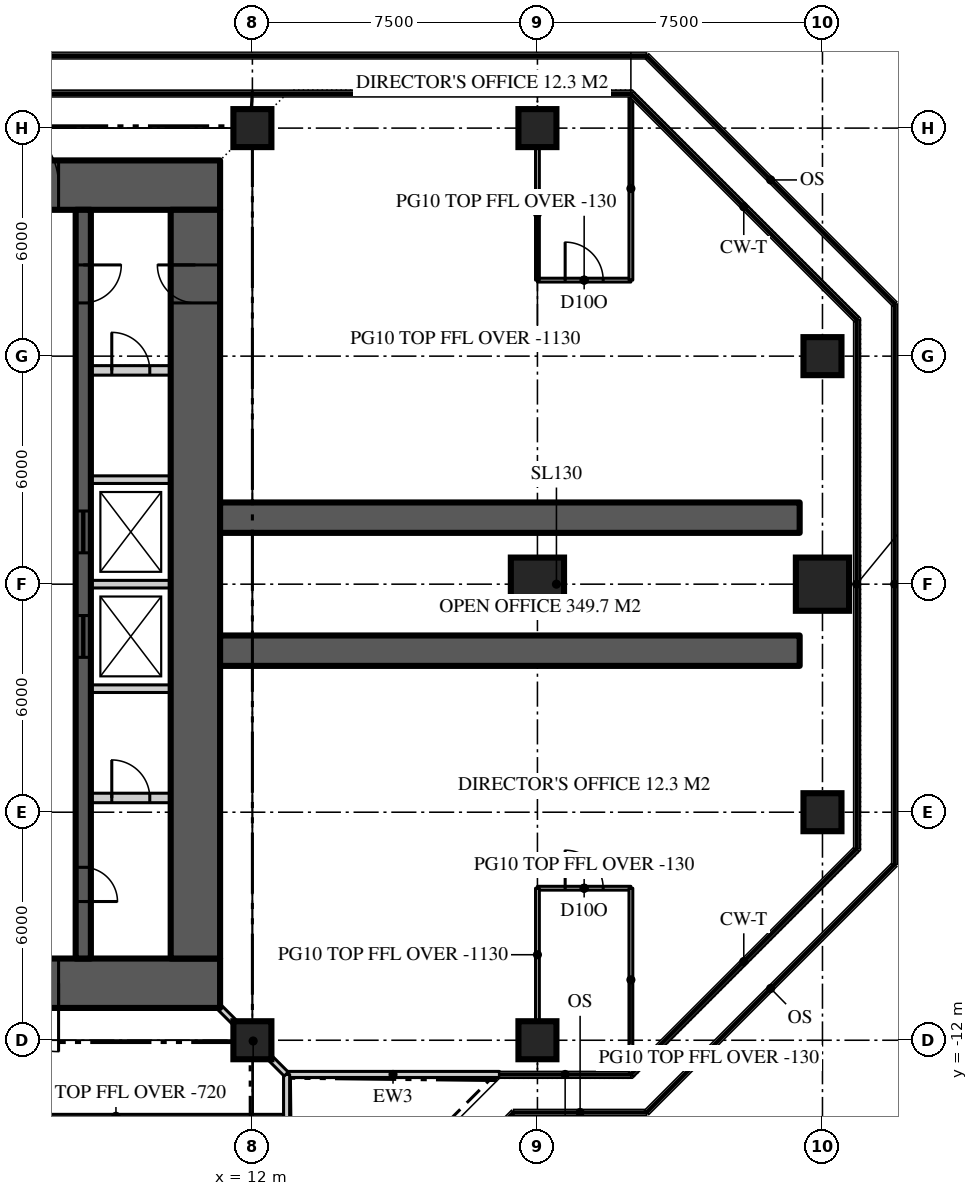
"""IFC4 building model, lengths in metres.
Left out: names, types, materials, properties, quantities, classifications, styles, units other than length and angle.
Written with IfcOpenShell. Run it as: python <this file> out.ifc"""

import sys

from ifc_helpers import new_model, si_unit, direction, frame, frame_2d, origin, origin_2d, place, context, subcontext, project, spatial, rectangle, extrude, element, fill, save


model = new_model("IFC4")
c1 = context("Model", 3, precision=1e-05, world=origin(), true_north=direction((0.0, 1.0)))
c2 = subcontext(c1, "Body", "Model", "MODEL_VIEW")
j1 = project(units=[si_unit("LENGTHUNIT", "METRE"), si_unit("PLANEANGLEUNIT", "RADIAN")], contexts=[c1])
p1 = place(None, origin())
s1 = spatial("IfcSite", under=j1, at=p1, CompositionType="ELEMENT")
p2 = place(p1, origin())
s2 = spatial("IfcBuilding", under=s1, at=p2, CompositionType="ELEMENT")
p3 = place(p2, frame((0.0, 0.0, 279.0)))
s3 = spatial("IfcBuildingStorey", under=s2, at=p3, CompositionType="ELEMENT", Elevation=279.0)
p4 = place(p3, frame((-11.15, 10.5, 0.0), z_axis=(0.0, 0.0, 1.0), x_axis=(1.0, 0.0, 0.0)))
e1 = element("IfcWall", 1, at=p4, inside=s3, PredefinedType="SHEAR", context=c2, shape_type="SweptSolid", body=[
    extrude(rectangle(XDim=22.3, YDim=1.3, at=frame_2d((11.15, 0.0))), origin(), (0.0, 0.0, 1.0), 3.9),
])
p5 = place(p4, frame((4.25, 0.0, 0.0)))
e2 = element("IfcOpeningElement", 2, at=p5, cuts=e1, PredefinedType="OPENING", context=c2, shape_type="SweptSolid", body=[
    extrude(rectangle(XDim=1.8, YDim=2.2, at=frame_2d((0.9, 1.1))), frame((0.0, 0.66, 0.0), z_axis=(0.0, -1.0, 0.0), x_axis=(1.0, 0.0, 0.0)), (0.0, 0.0, 1.0), 1.32),
])
p6 = place(p4, frame((16.25, 0.0, 0.0)))
e3 = element("IfcOpeningElement", 3, at=p6, cuts=e1, PredefinedType="OPENING", context=c2, shape_type="SweptSolid", body=[
    extrude(rectangle(XDim=1.8, YDim=2.2, at=frame_2d((0.9, 1.1))), frame((0.0, 0.66, 0.0), z_axis=(0.0, -1.0, 0.0), x_axis=(1.0, 0.0, 0.0)), (0.0, 0.0, 1.0), 1.32),
])
p7 = place(p3, frame((11.15, -10.5, 0.0), z_axis=(0.0, 0.0, 1.0), x_axis=(-1.0, 0.0, 0.0)))
e4 = element("IfcWall", 4, at=p7, inside=s3, PredefinedType="SHEAR", context=c2, shape_type="SweptSolid", body=[
    extrude(rectangle(XDim=22.3, YDim=1.3, at=frame_2d((11.15, 0.0))), origin(), (0.0, 0.0, 1.0), 3.9),
])
p8 = place(p7, frame((16.25, 0.0, 0.0)))
e5 = element("IfcOpeningElement", 5, at=p8, cuts=e4, PredefinedType="OPENING", context=c2, shape_type="SweptSolid", body=[
    extrude(rectangle(XDim=1.8, YDim=2.2, at=frame_2d((0.9, 1.1))), frame((0.0, 0.66, 0.0), z_axis=(0.0, -1.0, 0.0), x_axis=(1.0, 0.0, 0.0)), (0.0, 0.0, 1.0), 1.32),
])
p9 = place(p7, frame((4.25, 0.0, 0.0)))
e6 = element("IfcOpeningElement", 6, at=p9, cuts=e4, PredefinedType="OPENING", context=c2, shape_type="SweptSolid", body=[
    extrude(rectangle(XDim=1.8, YDim=2.2, at=frame_2d((0.9, 1.1))), frame((0.0, 0.66, 0.0), z_axis=(0.0, -1.0, 0.0), x_axis=(1.0, 0.0, 0.0)), (0.0, 0.0, 1.0), 1.32),
])
p10 = place(p3, frame((10.5, -9.85, 0.0), z_axis=(0.0, 0.0, 1.0), x_axis=(0.0, 1.0, 0.0)))
e7 = element("IfcWall", 7, at=p10, inside=s3, PredefinedType="SHEAR", context=c2, shape_type="SweptSolid", body=[
    extrude(rectangle(XDim=19.7, YDim=1.3, at=frame_2d((9.85, 0.0))), origin(), (0.0, 0.0, 1.0), 3.9),
])
p11 = place(p10, frame((17.25, 0.0, 0.0)))
e8 = element("IfcOpeningElement", 8, at=p11, cuts=e7, PredefinedType="OPENING", context=c2, shape_type="SweptSolid", body=[
    extrude(rectangle(XDim=1.0, YDim=2.2, at=frame_2d((0.5, 1.1))), frame((0.0, 0.66, 0.0), z_axis=(0.0, -1.0, 0.0), x_axis=(1.0, 0.0, 0.0)), (0.0, 0.0, 1.0), 1.32),
])
for number, where, z_axis, x_axis in (
    (9, (11.15, -1.75, 0.0), (0.0, 0.0, 1.0), (1.0, 0.0, 0.0)),
    (10, (11.15, 1.75, 0.0), (0.0, 0.0, 1.0), (1.0, 0.0, 0.0)),
):
    element("IfcWall", number, at=place(p3, frame(where, z_axis=z_axis, x_axis=x_axis)), inside=s3, PredefinedType="SHEAR", context=c2, shape_type="SweptSolid", body=[
        extrude(rectangle(XDim=15.25, YDim=0.8, at=frame_2d((7.625, 0.0))), origin(), (0.0, 0.0, 1.0), 3.9),
    ])
for number, where, z_axis, x_axis in (
    (11, (12.0, -12.0, 0.0), (0.0, 0.0, 1.0), (1.0, 0.0, 0.0)),
    (12, (19.5, -12.0, 0.0), (0.0, 0.0, 1.0), (1.0, 0.0, 0.0)),
    (13, (27.0, -6.0, 0.0), (0.0, 0.0, 1.0), (1.0, 0.0, 0.0)),
):
    element("IfcColumn", number, at=place(p3, frame(where, z_axis=z_axis, x_axis=x_axis)), inside=s3, PredefinedType="COLUMN", context=c2, shape_type="SweptSolid", body=[
        extrude(rectangle(XDim=1.0, YDim=1.0, at=origin_2d()), origin(), (0.0, 0.0, 1.0), 3.9),
    ])
for number, where, z_axis, x_axis in (
    (14, (19.5, 0.0, 0.0), (0.0, 0.0, 1.0), (1.0, 0.0, 0.0)),
    (15, (27.0, 0.0, 0.0), (0.0, 0.0, 1.0), (1.0, 0.0, 0.0)),
):
    element("IfcColumn", number, at=place(p3, frame(where, z_axis=z_axis, x_axis=x_axis)), inside=s3, PredefinedType="COLUMN", context=c2, shape_type="SweptSolid", body=[
        extrude(rectangle(XDim=1.4, YDim=1.4, at=origin_2d()), origin(), (0.0, 0.0, 1.0), 3.9),
    ])
for number, where, z_axis, x_axis in (
    (16, (27.0, 6.0, 0.0), (0.0, 0.0, 1.0), (1.0, 0.0, 0.0)),
    (17, (12.0, 12.0, 0.0), (0.0, 0.0, 1.0), (1.0, 0.0, 0.0)),
    (18, (19.5, 12.0, 0.0), (0.0, 0.0, 1.0), (1.0, 0.0, 0.0)),
):
    element("IfcColumn", number, at=place(p3, frame(where, z_axis=z_axis, x_axis=x_axis)), inside=s3, PredefinedType="COLUMN", context=c2, shape_type="SweptSolid", body=[
        extrude(rectangle(XDim=1.0, YDim=1.0, at=origin_2d()), origin(), (0.0, 0.0, 1.0), 3.9),
    ])
p12 = place(p3, frame((12.9, -12.9, 0.0), z_axis=(0.0, 0.0, 1.0), x_axis=(1.0, 0.0, 0.0)))
e19 = element("IfcWall", 19, at=p12, inside=s3, PredefinedType="SOLIDWALL", context=c2, shape_type="SweptSolid", body=[
    extrude(rectangle(XDim=5.6, YDim=0.16, at=frame_2d((2.8, 0.0))), origin(), (0.0, 0.0, 1.0), 3.77),
])
p13 = place(p3, frame((12.9, -18.5, 0.0), z_axis=(0.0, 0.0, 1.0), x_axis=(0.0, 1.0, 0.0)))
e20 = element("IfcWall", 20, at=p13, inside=s3, PredefinedType="SOLIDWALL", context=c2, shape_type="SweptSolid", body=[
    extrude(rectangle(XDim=5.6, YDim=0.16, at=frame_2d((2.8, 0.0))), origin(), (0.0, 0.0, 1.0), 3.77),
])
p14 = place(p13, frame((2.3, 0.0, 0.0)))
e21 = element("IfcOpeningElement", 21, at=p14, cuts=e20, PredefinedType="OPENING", context=c2, shape_type="SweptSolid", body=[
    extrude(rectangle(XDim=1.0, YDim=2.2, at=frame_2d((0.5, 1.1))), frame((0.0, 0.09, 0.0), z_axis=(0.0, -1.0, 0.0), x_axis=(1.0, 0.0, 0.0)), (0.0, 0.0, 1.0), 0.18),
])
p15 = place(p3, frame((7.55, 9.85, 0.0), z_axis=(0.0, 0.0, 1.0), x_axis=(0.0, -1.0, 0.0)))
e22 = element("IfcWall", 22, at=p15, inside=s3, PredefinedType="SHEAR", context=c2, shape_type="SweptSolid", body=[
    extrude(rectangle(XDim=19.7, YDim=0.4, at=frame_2d((9.85, 0.0))), origin(), (0.0, 0.0, 1.0), 3.9),
])
p16 = place(p15, frame((1.45, 0.0, 0.0)))
e23 = element("IfcOpeningElement", 23, at=p16, cuts=e22, PredefinedType="OPENING", context=c2, shape_type="SweptSolid", body=[
    extrude(rectangle(XDim=1.0, YDim=2.2, at=frame_2d((0.5, 1.1))), frame((0.0, 0.21, 0.0), z_axis=(0.0, -1.0, 0.0), x_axis=(1.0, 0.0, 0.0)), (0.0, 0.0, 1.0), 0.42),
])
p17 = place(p15, frame((17.3, 0.0, 0.0)))
e24 = element("IfcOpeningElement", 24, at=p17, cuts=e22, PredefinedType="OPENING", context=c2, shape_type="SweptSolid", body=[
    extrude(rectangle(XDim=0.9, YDim=2.1, at=frame_2d((0.45, 1.05))), frame((0.0, 0.21, 0.0), z_axis=(0.0, -1.0, 0.0), x_axis=(1.0, 0.0, 0.0)), (0.0, 0.0, 1.0), 0.42),
])
p18 = place(p15, frame((7.925, 0.0, 0.0)))
e25 = element("IfcOpeningElement", 25, at=p18, cuts=e22, PredefinedType="OPENING", context=c2, shape_type="SweptSolid", body=[
    extrude(rectangle(XDim=1.1, YDim=2.2, at=frame_2d((0.55, 1.1))), frame((0.0, 0.21, 0.0), z_axis=(0.0, -1.0, 0.0), x_axis=(1.0, 0.0, 0.0)), (0.0, 0.0, 1.0), 0.42),
])
p19 = place(p15, frame((10.675, 0.0, 0.0)))
e26 = element("IfcOpeningElement", 26, at=p19, cuts=e22, PredefinedType="OPENING", context=c2, shape_type="SweptSolid", body=[
    extrude(rectangle(XDim=1.1, YDim=2.2, at=frame_2d((0.55, 1.1))), frame((0.0, 0.21, 0.0), z_axis=(0.0, -1.0, 0.0), x_axis=(1.0, 0.0, 0.0)), (0.0, 0.0, 1.0), 0.42),
])
p20 = place(p3, frame((7.75, 5.625, 0.0), z_axis=(0.0, 0.0, 1.0), x_axis=(1.0, 0.0, 0.0)))
e27 = element("IfcWall", 27, at=p20, inside=s3, PredefinedType="SOLIDWALL", context=c2, shape_type="SweptSolid", body=[
    extrude(rectangle(XDim=2.1, YDim=0.25, at=frame_2d((1.05, 0.0))), origin(), (0.0, 0.0, 1.0), 3.7),
])
p21 = place(p20, frame((0.55, 0.0, 0.0)))
e28 = element("IfcOpeningElement", 28, at=p21, cuts=e27, PredefinedType="OPENING", context=c2, shape_type="SweptSolid", body=[
    extrude(rectangle(XDim=1.0, YDim=2.2, at=frame_2d((0.5, 1.1))), frame((0.0, 0.135, 0.0), z_axis=(0.0, -1.0, 0.0), x_axis=(1.0, 0.0, 0.0)), (0.0, 0.0, 1.0), 0.27),
])
p22 = place(p3, frame((7.75, -5.625, 0.0), z_axis=(0.0, 0.0, 1.0), x_axis=(1.0, 0.0, 0.0)))
e29 = element("IfcWall", 29, at=p22, inside=s3, PredefinedType="SOLIDWALL", context=c2, shape_type="SweptSolid", body=[
    extrude(rectangle(XDim=2.1, YDim=0.25, at=frame_2d((1.05, 0.0))), origin(), (0.0, 0.0, 1.0), 3.7),
])
p23 = place(p22, frame((0.55, 0.0, 0.0)))
e30 = element("IfcOpeningElement", 30, at=p23, cuts=e29, PredefinedType="OPENING", context=c2, shape_type="SweptSolid", body=[
    extrude(rectangle(XDim=1.0, YDim=2.2, at=frame_2d((0.5, 1.1))), frame((0.0, 0.135, 0.0), z_axis=(0.0, -1.0, 0.0), x_axis=(1.0, 0.0, 0.0)), (0.0, 0.0, 1.0), 0.27),
])
for number, where, z_axis, x_axis in (
    (31, (7.75, -2.75, 0.0), (0.0, 0.0, 1.0), (1.0, 0.0, 0.0)),
    (32, (7.75, 0.0, 0.0), (0.0, 0.0, 1.0), (1.0, 0.0, 0.0)),
    (33, (7.75, 2.75, 0.0), (0.0, 0.0, 1.0), (1.0, 0.0, 0.0)),
):
    element("IfcWall", number, at=place(p3, frame(where, z_axis=z_axis, x_axis=x_axis)), inside=s3, PredefinedType="SOLIDWALL", context=c2, shape_type="SweptSolid", body=[
        extrude(rectangle(XDim=2.1, YDim=0.2, at=frame_2d((1.05, 0.0))), origin(), (0.0, 0.0, 1.0), 3.7),
    ])
p24 = place(p3, frame((19.5, 8.0, 0.0), z_axis=(0.0, 0.0, 1.0), x_axis=(1.0, 0.0, 0.0)))
e34 = element("IfcWall", 34, at=p24, inside=s3, PredefinedType="PARTITIONING", context=c2, shape_type="SweptSolid", body=[
    extrude(rectangle(XDim=2.459, YDim=0.1, at=frame_2d((1.229, 0.0))), origin(), (0.0, 0.0, 1.0), 3.77),
])
p25 = place(p24, frame((0.729, 0.0, 0.0)))
e35 = element("IfcOpeningElement", 35, at=p25, cuts=e34, PredefinedType="OPENING", context=c2, shape_type="SweptSolid", body=[
    extrude(rectangle(XDim=1.0, YDim=2.2, at=frame_2d((0.5, 1.1))), frame((0.0, 0.06, 0.0), z_axis=(0.0, -1.0, 0.0), x_axis=(1.0, 0.0, 0.0)), (0.0, 0.0, 1.0), 0.12),
])
p26 = place(p3, frame((19.5, 8.0, 0.0), z_axis=(0.0, 0.0, 1.0), x_axis=(0.0, 1.0, 0.0)))
e36 = element("IfcWall", 36, at=p26, inside=s3, PredefinedType="PARTITIONING", context=c2, shape_type="SweptSolid", body=[
    extrude(rectangle(XDim=3.5, YDim=0.1, at=frame_2d((1.75, 0.0))), origin(), (0.0, 0.0, 1.0), 2.77),
])
p27 = place(p3, frame((21.959, 8.0, 0.0), z_axis=(0.0, 0.0, 1.0), x_axis=(0.0, 1.0, 0.0)))
e37 = element("IfcWall", 37, at=p27, inside=s3, PredefinedType="PARTITIONING", context=c2, shape_type="SweptSolid", body=[
    extrude(rectangle(XDim=4.82, YDim=0.1, at=frame_2d((2.41, 0.0))), origin(), (0.0, 0.0, 1.0), 3.77),
])
p28 = place(p3, frame((19.5, -8.0, 0.0), z_axis=(0.0, 0.0, 1.0), x_axis=(1.0, 0.0, 0.0)))
e38 = element("IfcWall", 38, at=p28, inside=s3, PredefinedType="PARTITIONING", context=c2, shape_type="SweptSolid", body=[
    extrude(rectangle(XDim=2.459, YDim=0.1, at=frame_2d((1.229, 0.0))), origin(), (0.0, 0.0, 1.0), 3.77),
])
p29 = place(p28, frame((0.729, 0.0, 0.0)))
e39 = element("IfcOpeningElement", 39, at=p29, cuts=e38, PredefinedType="OPENING", context=c2, shape_type="SweptSolid", body=[
    extrude(rectangle(XDim=1.0, YDim=2.2, at=frame_2d((0.5, 1.1))), frame((0.0, 0.06, 0.0), z_axis=(0.0, -1.0, 0.0), x_axis=(1.0, 0.0, 0.0)), (0.0, 0.0, 1.0), 0.12),
])
p30 = place(p3, frame((19.5, -8.0, 0.0), z_axis=(0.0, 0.0, 1.0), x_axis=(0.0, -1.0, 0.0)))
e40 = element("IfcWall", 40, at=p30, inside=s3, PredefinedType="PARTITIONING", context=c2, shape_type="SweptSolid", body=[
    extrude(rectangle(XDim=3.5, YDim=0.1, at=frame_2d((1.75, 0.0))), origin(), (0.0, 0.0, 1.0), 2.77),
])
p31 = place(p3, frame((21.959, -8.0, 0.0), z_axis=(0.0, 0.0, 1.0), x_axis=(0.0, -1.0, 0.0)))
e41 = element("IfcWall", 41, at=p31, inside=s3, PredefinedType="PARTITIONING", context=c2, shape_type="SweptSolid", body=[
    extrude(rectangle(XDim=4.82, YDim=0.1, at=frame_2d((2.41, 0.0))), origin(), (0.0, 0.0, 1.0), 3.77),
])
p32 = place(p3, frame((4.0, -14.0, 0.0), z_axis=(0.0, 0.0, 1.0), x_axis=(1.0, 0.0, 0.0)))
e42 = element("IfcWall", 42, at=p32, inside=s3, PredefinedType="PARTITIONING", context=c2, shape_type="SweptSolid", body=[
    extrude(rectangle(XDim=8.82, YDim=0.1, at=frame_2d((4.41, 0.0))), origin(), (0.0, 0.0, 1.0), 3.18),
])
p33 = place(p3, frame((11.15, -11.15, 0.0), z_axis=(0.0, 0.0, 1.0), x_axis=(0.707106781187, -0.707106781187, 0.0)))
e43 = element("IfcWall", 43, at=p33, inside=s3, PredefinedType="PARTITIONING", context=c2, shape_type="SweptSolid", body=[
    extrude(rectangle(XDim=2.461, YDim=0.15, at=frame_2d((1.23, 0.0))), origin(), (0.0, 0.0, 1.0), 3.22),
])
p34 = place(p6, origin())
e44 = element("IfcDoor", 44, at=p34, inside=s3, OperationType="DOUBLE_DOOR_DOUBLE_SWING", PredefinedType="DOOR", context=c2, shape_type="SweptSolid", body=[
    extrude(rectangle(XDim=1.8, YDim=2.2, at=frame_2d((0.9, 1.1))), frame((0.0, 0.025, 0.0), z_axis=(0.0, -1.0, 0.0), x_axis=(1.0, 0.0, 0.0)), (0.0, 0.0, 1.0), 0.05),
])
fill(e3, e44)
p35 = place(p9, origin())
e45 = element("IfcDoor", 45, at=p35, inside=s3, OperationType="DOUBLE_DOOR_DOUBLE_SWING", PredefinedType="DOOR", context=c2, shape_type="SweptSolid", body=[
    extrude(rectangle(XDim=1.8, YDim=2.2, at=frame_2d((0.9, 1.1))), frame((0.0, 0.025, 0.0), z_axis=(0.0, -1.0, 0.0), x_axis=(1.0, 0.0, 0.0)), (0.0, 0.0, 1.0), 0.05),
])
fill(e6, e45)
p36 = place(p16, origin())
e46 = element("IfcDoor", 46, at=p36, inside=s3, OperationType="SINGLE_SWING_LEFT", PredefinedType="DOOR", context=c2, shape_type="SweptSolid", body=[
    extrude(rectangle(XDim=1.0, YDim=2.2, at=frame_2d((0.5, 1.1))), frame((0.0, 0.025, 0.0), z_axis=(0.0, -1.0, 0.0), x_axis=(1.0, 0.0, 0.0)), (0.0, 0.0, 1.0), 0.05),
])
fill(e23, e46)
p37 = place(p11, origin())
e47 = element("IfcDoor", 47, at=p37, inside=s3, OperationType="SINGLE_SWING_RIGHT", PredefinedType="DOOR", context=c2, shape_type="SweptSolid", body=[
    extrude(rectangle(XDim=1.0, YDim=2.2, at=frame_2d((0.5, 1.1))), frame((0.0, 0.025, 0.0), z_axis=(0.0, -1.0, 0.0), x_axis=(1.0, 0.0, 0.0)), (0.0, 0.0, 1.0), 0.05),
])
fill(e8, e47)
p38 = place(p17, origin())
e48 = element("IfcDoor", 48, at=p38, inside=s3, OperationType="SINGLE_SWING_RIGHT", PredefinedType="DOOR", context=c2, shape_type="SweptSolid", body=[
    extrude(rectangle(XDim=0.9, YDim=2.1, at=frame_2d((0.45, 1.05))), frame((0.0, 0.025, 0.0), z_axis=(0.0, -1.0, 0.0), x_axis=(1.0, 0.0, 0.0)), (0.0, 0.0, 1.0), 0.05),
])
fill(e24, e48)
p39 = place(p18, origin())
e49 = element("IfcDoor", 49, at=p39, inside=s3, OperationType="SLIDING_TO_LEFT", PredefinedType="DOOR", context=c2, shape_type="SweptSolid", body=[
    extrude(rectangle(XDim=1.1, YDim=2.2, at=frame_2d((0.55, 1.1))), frame((0.0, 0.025, 0.0), z_axis=(0.0, -1.0, 0.0), x_axis=(1.0, 0.0, 0.0)), (0.0, 0.0, 1.0), 0.05),
])
fill(e25, e49)
p40 = place(p19, origin())
e50 = element("IfcDoor", 50, at=p40, inside=s3, OperationType="SLIDING_TO_LEFT", PredefinedType="DOOR", context=c2, shape_type="SweptSolid", body=[
    extrude(rectangle(XDim=1.1, YDim=2.2, at=frame_2d((0.55, 1.1))), frame((0.0, 0.025, 0.0), z_axis=(0.0, -1.0, 0.0), x_axis=(1.0, 0.0, 0.0)), (0.0, 0.0, 1.0), 0.05),
])
fill(e26, e50)
p41 = place(p25, origin())
e51 = element("IfcDoor", 51, at=p41, inside=s3, OperationType="SINGLE_SWING_LEFT", PredefinedType="DOOR", context=c2, shape_type="SweptSolid", body=[
    extrude(rectangle(XDim=1.0, YDim=2.2, at=frame_2d((0.5, 1.1))), frame((0.0, 0.025, 0.0), z_axis=(0.0, -1.0, 0.0), x_axis=(1.0, 0.0, 0.0)), (0.0, 0.0, 1.0), 0.05),
])
fill(e35, e51)
p42 = place(p29, origin())
e52 = element("IfcDoor", 52, at=p42, inside=s3, OperationType="SINGLE_SWING_LEFT", PredefinedType="DOOR", context=c2, shape_type="SweptSolid", body=[
    extrude(rectangle(XDim=1.0, YDim=2.2, at=frame_2d((0.5, 1.1))), frame((0.0, 0.025, 0.0), z_axis=(0.0, -1.0, 0.0), x_axis=(1.0, 0.0, 0.0)), (0.0, 0.0, 1.0), 0.05),
])
fill(e39, e52)
p43 = place(p21, origin())
e53 = element("IfcDoor", 53, at=p43, inside=s3, OperationType="SINGLE_SWING_LEFT", PredefinedType="DOOR", context=c2, shape_type="SweptSolid", body=[
    extrude(rectangle(XDim=1.0, YDim=2.2, at=frame_2d((0.5, 1.1))), frame((0.0, 0.025, 0.0), z_axis=(0.0, -1.0, 0.0), x_axis=(1.0, 0.0, 0.0)), (0.0, 0.0, 1.0), 0.05),
])
fill(e28, e53)
p44 = place(p23, origin())
e54 = element("IfcDoor", 54, at=p44, inside=s3, OperationType="SINGLE_SWING_LEFT", PredefinedType="DOOR", context=c2, shape_type="SweptSolid", body=[
    extrude(rectangle(XDim=1.0, YDim=2.2, at=frame_2d((0.5, 1.1))), frame((0.0, 0.025, 0.0), z_axis=(0.0, -1.0, 0.0), x_axis=(1.0, 0.0, 0.0)), (0.0, 0.0, 1.0), 0.05),
])
fill(e30, e54)
save(model, sys.argv[1])
